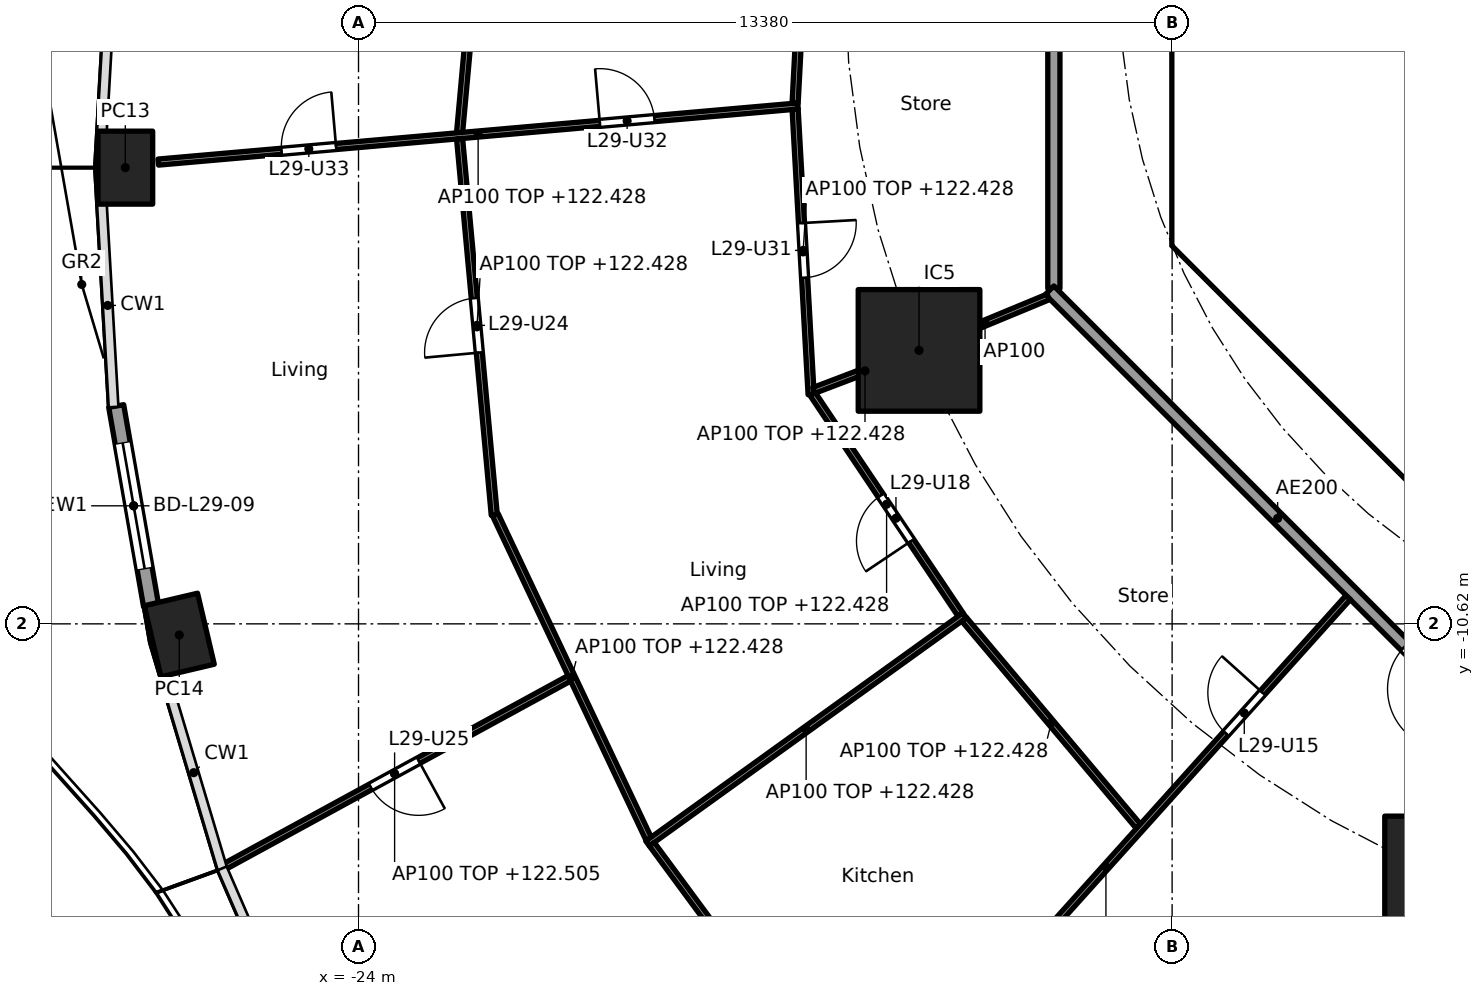
"""IFC4 building model, lengths in metres.
Left out: names, types, materials, properties, quantities, classifications, styles, units other than length and angle.
Written with IfcOpenShell. Run it as: python <this file> out.ifc"""

import sys

from ifc_helpers import new_model, si_unit, direction, frame, frame_2d, origin, origin_2d, place, context, subcontext, project, spatial, polyline, rectangle, hollow_rectangle, outline, extrude, element, fill, save


model = new_model("IFC4")
c1 = context("Model", 3, precision=1e-05, world=origin(), true_north=direction((0.0, 1.0)))
c2 = subcontext(c1, "Body", "Model", "MODEL_VIEW")
j1 = project(units=[si_unit("LENGTHUNIT", "METRE"), si_unit("PLANEANGLEUNIT", "RADIAN")], contexts=[c1])
p1 = place(None, origin())
s1 = spatial("IfcSite", under=j1, at=p1, CompositionType="ELEMENT")
p2 = place(p1, origin())
s2 = spatial("IfcBuilding", under=s1, at=p2, CompositionType="ELEMENT")
p3 = place(p2, frame((0.0, 0.0, 119.6)))
s3 = spatial("IfcBuildingStorey", under=s2, at=p3, CompositionType="ELEMENT", Elevation=119.6)
for number, where, z_axis, x_axis in (
    (1, (-27.835, -3.118, -0.26), (0.0, 0.0, 1.0), (0.0, -1.0, 0.0)),
    (2, (-26.948, -10.803, -0.26), (0.0, 0.0, 1.0), (0.229, -0.973, 0.0)),
):
    element("IfcColumn", number, at=place(p3, frame(where, z_axis=z_axis, x_axis=x_axis)), inside=s3, PredefinedType="COLUMN", context=c2, shape_type="SweptSolid", body=[
        extrude(hollow_rectangle(XDim=1.2, YDim=0.9, WallThickness=0.04, at=origin_2d()), origin(), (0.0, 0.0, 1.0), 3.96),
    ])
for number, where, z_axis, x_axis in (
    (3, (-14.782, -6.123, 0.0), (0.0, 0.0, 1.0), (1.0, 0.0, 0.0)),
    (4, (-6.123, -14.782, 0.0), (0.0, 0.0, 1.0), (1.0, 0.0, 0.0)),
):
    element("IfcColumn", number, at=place(p3, frame(where, z_axis=z_axis, x_axis=x_axis)), inside=s3, PredefinedType="COLUMN", context=c2, shape_type="SweptSolid", body=[
        extrude(rectangle(XDim=2.0, YDim=2.0, at=origin_2d()), origin(), (0.0, 0.0, 1.0), 3.7),
    ])
p4 = place(p3, frame((-27.411, -10.32, 0.0), z_axis=(0.0, 0.0, 1.0), x_axis=(-0.172163521006, 0.985068384446, 0.0)))
e5 = element("IfcWall", 5, at=p4, inside=s3, PredefinedType="SOLIDWALL", context=c2, shape_type="SweptSolid", body=[
    extrude(rectangle(XDim=3.333, YDim=0.25, at=frame_2d((1.666, 0.0))), origin(), (0.0, 0.0, 1.0), 3.44),
])
p5 = place(p4, frame((0.616, 0.0, 0.0)))
e6 = element("IfcOpeningElement", 6, at=p5, cuts=e5, PredefinedType="OPENING", context=c2, shape_type="SweptSolid", body=[
    extrude(rectangle(XDim=2.1, YDim=2.4, at=frame_2d((1.05, 1.2))), frame((0.0, 0.135, 0.0), z_axis=(0.0, -1.0, 0.0), x_axis=(1.0, 0.0, 0.0)), (0.0, 0.0, 1.0), 0.27),
])
p6 = place(p3, frame((-10.325, 3.801, 0.0), z_axis=(0.0, 0.0, 1.0), x_axis=(0.0, -1.0, 0.0)))
e7 = element("IfcWall", 7, at=p6, inside=s3, PredefinedType="SHEAR", context=c2, shape_type="SweptSolid", body=[
    extrude(rectangle(XDim=7.602, YDim=0.6, at=frame_2d((3.801, 0.0))), origin(), (0.0, 0.0, 1.0), 3.44),
])
p7 = place(p6, frame((0.651, 0.0, 0.0)))
e8 = element("IfcOpeningElement", 8, at=p7, cuts=e7, PredefinedType="OPENING", context=c2, shape_type="SweptSolid", body=[
    extrude(rectangle(XDim=1.5, YDim=2.1, at=frame_2d((0.75, 1.05))), frame((0.0, 0.31, 0.0), z_axis=(0.0, -1.0, 0.0), x_axis=(1.0, 0.0, 0.0)), (0.0, 0.0, 1.0), 0.62),
])
p8 = place(p6, frame((5.451, 0.0, 0.0)))
e9 = element("IfcOpeningElement", 9, at=p8, cuts=e7, PredefinedType="OPENING", context=c2, shape_type="SweptSolid", body=[
    extrude(rectangle(XDim=1.5, YDim=2.1, at=frame_2d((0.75, 1.05))), frame((0.0, 0.31, 0.0), z_axis=(0.0, -1.0, 0.0), x_axis=(1.0, 0.0, 0.0)), (0.0, 0.0, 1.0), 0.62),
])
p9 = place(p3, frame((-9.988, -4.613, 0.0), z_axis=(0.0, 0.0, 1.0), x_axis=(0.707106781187, -0.707106781187, 0.0)))
e10 = element("IfcWall", 10, at=p9, inside=s3, PredefinedType="SHEAR", context=c2, shape_type="SweptSolid", body=[
    extrude(rectangle(XDim=7.602, YDim=0.6, at=frame_2d((3.801, 0.0))), origin(), (0.0, 0.0, 1.0), 3.44),
])
p10 = place(p9, frame((6.151, 0.0, 0.0)))
e11 = element("IfcOpeningElement", 11, at=p10, cuts=e10, PredefinedType="OPENING", context=c2, shape_type="SweptSolid", body=[
    extrude(rectangle(XDim=1.1, YDim=2.1, at=frame_2d((0.55, 1.05))), frame((0.0, 0.31, 0.0), z_axis=(0.0, -1.0, 0.0), x_axis=(1.0, 0.0, 0.0)), (0.0, 0.0, 1.0), 0.62),
])
p11 = place(p3, origin())
e12 = element("IfcWall", 12, at=p11, inside=s3, PredefinedType="SHEAR", context=c2, shape_type="SweptSolid", body=[
    extrude(outline(polyline([(-10.625, -3.801), (-10.025, -3.801), (-10.025, -4.152), (-9.776, -4.401), (-10.2, -4.825), (-10.625, -4.401), (-10.625, -3.801)])), origin(), (0.0, 0.0, 1.0), 3.44),
])
p12 = place(p3, frame((-10.025, -4.0, 0.0), z_axis=(0.0, 0.0, 1.0), x_axis=(1.0, 0.0, 0.0)))
e13 = element("IfcWall", 13, at=p12, inside=s3, PredefinedType="PARTITIONING", context=c2, shape_type="SweptSolid", body=[
    extrude(rectangle(XDim=3.325, YDim=0.2, at=frame_2d((1.662, 0.0))), origin(), (0.0, 0.0, 1.0), 3.44),
])
p13 = place(p3, frame((-12.565, 5.304, 0.0), z_axis=(0.0, 0.0, 1.0), x_axis=(0.0, -1.0, 0.0)))
e14 = element("IfcWall", 14, at=p13, inside=s3, PredefinedType="PARTITIONING", context=c2, shape_type="SweptSolid", body=[
    extrude(rectangle(XDim=10.409, YDim=0.2, at=frame_2d((5.205, 0.0))), origin(), (0.0, 0.0, 1.0), 3.44),
])
p14 = place(p3, frame((-12.635, -5.134, 0.0), z_axis=(0.0, 0.0, 1.0), x_axis=(0.707106781187, -0.707106781187, 0.0)))
e15 = element("IfcWall", 15, at=p14, inside=s3, PredefinedType="PARTITIONING", context=c2, shape_type="SweptSolid", body=[
    extrude(rectangle(XDim=10.609, YDim=0.2, at=frame_2d((5.305, 0.0))), origin(), (0.0, 0.0, 1.0), 3.44),
])
p15 = place(p14, frame((8.274, 0.0, 0.0)))
e16 = element("IfcOpeningElement", 16, at=p15, cuts=e15, PredefinedType="OPENING", context=c2, shape_type="SweptSolid", body=[
    extrude(rectangle(XDim=1.0, YDim=2.1, at=frame_2d((0.5, 1.05))), frame((0.0, 0.11, 0.0), z_axis=(0.0, -1.0, 0.0), x_axis=(1.0, 0.0, 0.0)), (0.0, 0.0, 1.0), 0.22),
])
p16 = place(p3, frame((-16.576, 2.585, 0.0), z_axis=(0.0, 0.0, 1.0), x_axis=(-0.052509224895, -0.998620439056, 0.0)))
e17 = element("IfcWall", 17, at=p16, inside=s3, PredefinedType="PARTITIONING", context=c2, shape_type="SweptSolid", body=[
    extrude(rectangle(XDim=4.649, YDim=0.1, at=frame_2d((2.325, 0.0))), origin(), (0.0, 0.0, 1.0), 2.828),
])
p17 = place(p3, frame((-21.777, 3.621, 0.0), z_axis=(0.0, 0.0, 1.0), x_axis=(-0.090606877484, -0.995886737412, 0.0)))
e18 = element("IfcWall", 18, at=p17, inside=s3, PredefinedType="PARTITIONING", context=c2, shape_type="SweptSolid", body=[
    extrude(rectangle(XDim=6.189, YDim=0.1, at=frame_2d((3.095, 0.0))), origin(), (0.0, 0.0, 1.0), 2.828),
])
p18 = place(p3, frame((-16.773, -2.104, 0.0), z_axis=(0.0, 0.0, 1.0), x_axis=(-0.996176206701, -0.087366842701, 0.0)))
e19 = element("IfcWall", 19, at=p18, inside=s3, PredefinedType="PARTITIONING", context=c2, shape_type="SweptSolid", body=[
    extrude(rectangle(XDim=10.56, YDim=0.1, at=frame_2d((5.28, 0.0))), origin(), (0.0, 0.0, 1.0), 2.828),
])
p19 = place(p18, frame((2.37, 0.0, 0.0)))
e20 = element("IfcOpeningElement", 20, at=p19, cuts=e19, PredefinedType="OPENING", context=c2, shape_type="SweptSolid", body=[
    extrude(rectangle(XDim=0.9, YDim=2.1, at=frame_2d((0.45, 1.05))), frame((0.0, 0.06, 0.0), z_axis=(0.0, -1.0, 0.0), x_axis=(1.0, 0.0, 0.0)), (0.0, 0.0, 1.0), 0.12),
])
p20 = place(p18, frame((7.625, 0.0, 0.0)))
e21 = element("IfcOpeningElement", 21, at=p20, cuts=e19, PredefinedType="OPENING", context=c2, shape_type="SweptSolid", body=[
    extrude(rectangle(XDim=0.9, YDim=2.1, at=frame_2d((0.45, 1.05))), frame((0.0, 0.06, 0.0), z_axis=(0.0, -1.0, 0.0), x_axis=(1.0, 0.0, 0.0)), (0.0, 0.0, 1.0), 0.12),
])
p21 = place(p3, frame((-16.82, -2.158, 0.0), z_axis=(0.0, 0.0, 1.0), x_axis=(0.055967931845, -0.998432566879, 0.0)))
e22 = element("IfcWall", 22, at=p21, inside=s3, PredefinedType="PARTITIONING", context=c2, shape_type="SweptSolid", body=[
    extrude(rectangle(XDim=4.698, YDim=0.1, at=frame_2d((2.349, 0.0))), origin(), (0.0, 0.0, 1.0), 2.828),
])
p22 = place(p21, frame((1.874, 0.0, 0.0)))
e23 = element("IfcOpeningElement", 23, at=p22, cuts=e22, PredefinedType="OPENING", context=c2, shape_type="SweptSolid", body=[
    extrude(rectangle(XDim=0.9, YDim=2.1, at=frame_2d((0.45, 1.05))), frame((0.0, 0.06, 0.0), z_axis=(0.0, -1.0, 0.0), x_axis=(1.0, 0.0, 0.0)), (0.0, 0.0, 1.0), 0.12),
])
p23 = place(p3, frame((-22.338, -2.642, 0.0), z_axis=(0.0, 0.0, 1.0), x_axis=(0.091768304523, -0.995780386574, 0.0)))
e24 = element("IfcWall", 24, at=p23, inside=s3, PredefinedType="PARTITIONING", context=c2, shape_type="SweptSolid", body=[
    extrude(rectangle(XDim=6.215, YDim=0.1, at=frame_2d((3.107, 0.0))), origin(), (0.0, 0.0, 1.0), 2.828),
])
p24 = place(p23, frame((2.632, 0.0, 0.0)))
e25 = element("IfcOpeningElement", 25, at=p24, cuts=e24, PredefinedType="OPENING", context=c2, shape_type="SweptSolid", body=[
    extrude(rectangle(XDim=0.9, YDim=2.1, at=frame_2d((0.45, 1.05))), frame((0.0, 0.06, 0.0), z_axis=(0.0, -1.0, 0.0), x_axis=(1.0, 0.0, 0.0)), (0.0, 0.0, 1.0), 0.12),
])
p25 = place(p3, frame((-12.657, -5.243, 0.0), z_axis=(0.0, 0.0, 1.0), x_axis=(-0.923864733477, -0.382719158442, 0.0)))
e26 = element("IfcWall", 26, at=p25, inside=s3, PredefinedType="PARTITIONING", context=c2, shape_type="SweptSolid", body=[
    extrude(rectangle(XDim=2.25, YDim=0.1, at=frame_2d((1.125, 0.0))), origin(), (0.0, 0.0, 1.0), 3.44),
])
p26 = place(p3, frame((-14.829, -6.141, 0.0), z_axis=(0.0, 0.0, 1.0), x_axis=(-0.934704367514, -0.355426146128, 0.0)))
e27 = element("IfcWall", 27, at=p26, inside=s3, PredefinedType="PARTITIONING", context=c2, shape_type="SweptSolid", body=[
    extrude(rectangle(XDim=1.802, YDim=0.1, at=frame_2d((0.901, 0.0))), origin(), (0.0, 0.0, 1.0), 2.828),
])
p27 = place(p3, frame((-16.532, -6.84, 0.0), z_axis=(0.0, 0.0, 1.0), x_axis=(0.556994773624, -0.830515997531, 0.0)))
e28 = element("IfcWall", 28, at=p27, inside=s3, PredefinedType="PARTITIONING", context=c2, shape_type="SweptSolid", body=[
    extrude(rectangle(XDim=4.366, YDim=0.1, at=frame_2d((2.183, 0.0))), origin(), (0.0, 0.0, 1.0), 2.828),
])
p28 = place(p27, frame((2.01, 0.0, 0.0)))
e29 = element("IfcOpeningElement", 29, at=p28, cuts=e28, PredefinedType="OPENING", context=c2, shape_type="SweptSolid", body=[
    extrude(rectangle(XDim=0.9, YDim=2.1, at=frame_2d((0.45, 1.05))), frame((0.0, 0.06, 0.0), z_axis=(0.0, -1.0, 0.0), x_axis=(1.0, 0.0, 0.0)), (0.0, 0.0, 1.0), 0.12),
])
p29 = place(p3, frame((-21.75, -8.826, 0.0), z_axis=(0.0, 0.0, 1.0), x_axis=(0.427739388908, -0.903902104863, 0.0)))
e30 = element("IfcWall", 30, at=p29, inside=s3, PredefinedType="PARTITIONING", context=c2, shape_type="SweptSolid", body=[
    extrude(rectangle(XDim=5.899, YDim=0.1, at=frame_2d((2.949, 0.0))), origin(), (0.0, 0.0, 1.0), 2.828),
])
p30 = place(p3, frame((-20.533, -11.516, 0.0), z_axis=(0.0, 0.0, 1.0), x_axis=(-0.877731656478, -0.479152521872, 0.0)))
e31 = element("IfcWall", 31, at=p30, inside=s3, PredefinedType="PARTITIONING", context=c2, shape_type="SweptSolid", body=[
    extrude(rectangle(XDim=6.548, YDim=0.1, at=frame_2d((3.274, 0.0))), origin(), (0.0, 0.0, 1.0), 2.905),
])
p31 = place(p30, frame((2.824, 0.0, 0.0)))
e32 = element("IfcOpeningElement", 32, at=p31, cuts=e31, PredefinedType="OPENING", context=c2, shape_type="SweptSolid", body=[
    extrude(rectangle(XDim=0.9, YDim=2.1, at=frame_2d((0.45, 1.05))), frame((0.0, 0.06, 0.0), z_axis=(0.0, -1.0, 0.0), x_axis=(1.0, 0.0, 0.0)), (0.0, 0.0, 1.0), 0.12),
])
p32 = place(p3, frame((-14.031, -10.479, 0.0), z_axis=(0.0, 0.0, 1.0), x_axis=(-0.811653955345, -0.584138559567, 0.0)))
e33 = element("IfcWall", 33, at=p32, inside=s3, PredefinedType="PARTITIONING", context=c2, shape_type="SweptSolid", body=[
    extrude(rectangle(XDim=6.426, YDim=0.1, at=frame_2d((3.213, 0.0))), origin(), (0.0, 0.0, 1.0), 2.828),
])
p33 = place(p3, frame((-14.04, -10.547, 0.0), z_axis=(0.0, 0.0, 1.0), x_axis=(0.644036028289, -0.764995159635, 0.0)))
e34 = element("IfcWall", 34, at=p33, inside=s3, PredefinedType="PARTITIONING", context=c2, shape_type="SweptSolid", body=[
    extrude(rectangle(XDim=4.448, YDim=0.1, at=frame_2d((2.224, 0.0))), origin(), (0.0, 0.0, 1.0), 2.828),
])
p34 = place(p3, frame((-19.176, -14.244, 0.0), z_axis=(0.0, 0.0, 1.0), x_axis=(0.593532053206, -0.80481035146, 0.0)))
e35 = element("IfcWall", 35, at=p34, inside=s3, PredefinedType="PARTITIONING", context=c2, shape_type="SweptSolid", body=[
    extrude(rectangle(XDim=5.876, YDim=0.1, at=frame_2d((2.938, 0.0))), origin(), (0.0, 0.0, 1.0), 2.828),
])
p35 = place(p34, frame((3.957, 0.0, 0.0)))
e36 = element("IfcOpeningElement", 36, at=p35, cuts=e35, PredefinedType="OPENING", context=c2, shape_type="SweptSolid", body=[
    extrude(rectangle(XDim=0.9, YDim=2.1, at=frame_2d((0.45, 1.05))), frame((0.0, 0.06, 0.0), z_axis=(0.0, -1.0, 0.0), x_axis=(1.0, 0.0, 0.0)), (0.0, 0.0, 1.0), 0.12),
])
p36 = place(p3, frame((-7.725, -10.186, 0.0), z_axis=(0.0, 0.0, 1.0), x_axis=(-0.668498346565, -0.743713628112, 0.0)))
e37 = element("IfcWall", 37, at=p36, inside=s3, PredefinedType="PARTITIONING", context=c2, shape_type="SweptSolid", body=[
    extrude(rectangle(XDim=11.919, YDim=0.1, at=frame_2d((5.959, 0.0))), origin(), (0.0, 0.0, 1.0), 2.756),
])
p37 = place(p36, frame((2.106, 0.0, 0.0)))
e38 = element("IfcOpeningElement", 38, at=p37, cuts=e37, PredefinedType="OPENING", context=c2, shape_type="SweptSolid", body=[
    extrude(rectangle(XDim=0.9, YDim=2.1, at=frame_2d((0.45, 1.05))), frame((0.0, 0.06, 0.0), z_axis=(0.0, -1.0, 0.0), x_axis=(1.0, 0.0, 0.0)), (0.0, 0.0, 1.0), 0.12),
])
p38 = place(p36, frame((8.041, 0.0, 0.0)))
e39 = element("IfcOpeningElement", 39, at=p38, cuts=e37, PredefinedType="OPENING", context=c2, shape_type="SweptSolid", body=[
    extrude(rectangle(XDim=0.9, YDim=2.1, at=frame_2d((0.45, 1.05))), frame((0.0, 0.06, 0.0), z_axis=(0.0, -1.0, 0.0), x_axis=(1.0, 0.0, 0.0)), (0.0, 0.0, 1.0), 0.12),
])
p39 = place(p3, frame((-6.149, -14.825, 0.0), z_axis=(0.0, 0.0, 1.0), x_axis=(-0.525396393596, -0.850857584791, 0.0)))
e40 = element("IfcWall", 40, at=p39, inside=s3, PredefinedType="PARTITIONING", context=c2, shape_type="SweptSolid", body=[
    extrude(rectangle(XDim=9.643, YDim=0.1, at=frame_2d((4.822, 0.0))), origin(), (0.0, 0.0, 1.0), 3.44),
])
p40 = place(p39, frame((1.485, 0.0, 0.0)))
e41 = element("IfcOpeningElement", 41, at=p40, cuts=e40, PredefinedType="OPENING", context=c2, shape_type="SweptSolid", body=[
    extrude(rectangle(XDim=0.9, YDim=2.1, at=frame_2d((0.45, 1.05))), frame((0.0, 0.06, 0.0), z_axis=(0.0, -1.0, 0.0), x_axis=(1.0, 0.0, 0.0)), (0.0, 0.0, 1.0), 0.12),
])
p41 = place(p39, frame((5.744, 0.0, 0.0)))
e42 = element("IfcOpeningElement", 42, at=p41, cuts=e40, PredefinedType="OPENING", context=c2, shape_type="SweptSolid", body=[
    extrude(rectangle(XDim=0.9, YDim=2.1, at=frame_2d((0.45, 1.05))), frame((0.0, 0.06, 0.0), z_axis=(0.0, -1.0, 0.0), x_axis=(1.0, 0.0, 0.0)), (0.0, 0.0, 1.0), 0.12),
])
p42 = place(p5, origin())
e43 = element("IfcDoor", 43, at=p42, inside=s3, OperationType="SLIDING_TO_LEFT", PredefinedType="DOOR", context=c2, shape_type="SweptSolid", body=[
    extrude(rectangle(XDim=2.1, YDim=2.4, at=frame_2d((1.05, 1.2))), frame((0.0, 0.025, 0.0), z_axis=(0.0, -1.0, 0.0), x_axis=(1.0, 0.0, 0.0)), (0.0, 0.0, 1.0), 0.05),
])
fill(e6, e43)
p43 = place(p8, origin())
e44 = element("IfcDoor", 44, at=p43, inside=s3, OperationType="DOUBLE_DOOR_SINGLE_SWING", PredefinedType="DOOR", context=c2, shape_type="SweptSolid", body=[
    extrude(rectangle(XDim=1.5, YDim=2.1, at=frame_2d((0.75, 1.05))), frame((0.0, 0.025, 0.0), z_axis=(0.0, -1.0, 0.0), x_axis=(1.0, 0.0, 0.0)), (0.0, 0.0, 1.0), 0.05),
])
fill(e9, e44)
p44 = place(p15, frame((1.0, 0.0, 0.0), x_axis=(-1.0, 0.0, 0.0)))
e45 = element("IfcDoor", 45, at=p44, inside=s3, OperationType="SINGLE_SWING_LEFT", PredefinedType="DOOR", context=c2, shape_type="SweptSolid", body=[
    extrude(rectangle(XDim=1.0, YDim=2.1, at=frame_2d((0.5, 1.05))), frame((0.0, 0.025, 0.0), z_axis=(0.0, -1.0, 0.0), x_axis=(1.0, 0.0, 0.0)), (0.0, 0.0, 1.0), 0.05),
])
fill(e16, e45)
p45 = place(p37, frame((0.9, 0.0, 0.0), x_axis=(-1.0, 0.0, 0.0)))
e46 = element("IfcDoor", 46, at=p45, inside=s3, OperationType="SINGLE_SWING_RIGHT", PredefinedType="DOOR", context=c2, shape_type="SweptSolid", body=[
    extrude(rectangle(XDim=0.9, YDim=2.1, at=frame_2d((0.45, 1.05))), frame((0.0, 0.025, 0.0), z_axis=(0.0, -1.0, 0.0), x_axis=(1.0, 0.0, 0.0)), (0.0, 0.0, 1.0), 0.05),
])
fill(e38, e46)
p46 = place(p28, frame((0.9, 0.0, 0.0), x_axis=(-1.0, 0.0, 0.0)))
e47 = element("IfcDoor", 47, at=p46, inside=s3, OperationType="SINGLE_SWING_LEFT", PredefinedType="DOOR", context=c2, shape_type="SweptSolid", body=[
    extrude(rectangle(XDim=0.9, YDim=2.1, at=frame_2d((0.45, 1.05))), frame((0.0, 0.025, 0.0), z_axis=(0.0, -1.0, 0.0), x_axis=(1.0, 0.0, 0.0)), (0.0, 0.0, 1.0), 0.05),
])
fill(e29, e47)
p47 = place(p24, frame((0.9, 0.0, 0.0), x_axis=(-1.0, 0.0, 0.0)))
e48 = element("IfcDoor", 48, at=p47, inside=s3, OperationType="SINGLE_SWING_LEFT", PredefinedType="DOOR", context=c2, shape_type="SweptSolid", body=[
    extrude(rectangle(XDim=0.9, YDim=2.1, at=frame_2d((0.45, 1.05))), frame((0.0, 0.025, 0.0), z_axis=(0.0, -1.0, 0.0), x_axis=(1.0, 0.0, 0.0)), (0.0, 0.0, 1.0), 0.05),
])
fill(e25, e48)
p48 = place(p31, origin())
e49 = element("IfcDoor", 49, at=p48, inside=s3, OperationType="SINGLE_SWING_LEFT", PredefinedType="DOOR", context=c2, shape_type="SweptSolid", body=[
    extrude(rectangle(XDim=0.9, YDim=2.1, at=frame_2d((0.45, 1.05))), frame((0.0, 0.025, 0.0), z_axis=(0.0, -1.0, 0.0), x_axis=(1.0, 0.0, 0.0)), (0.0, 0.0, 1.0), 0.05),
])
fill(e32, e49)
p49 = place(p22, origin())
e50 = element("IfcDoor", 50, at=p49, inside=s3, OperationType="SINGLE_SWING_LEFT", PredefinedType="DOOR", context=c2, shape_type="SweptSolid", body=[
    extrude(rectangle(XDim=0.9, YDim=2.1, at=frame_2d((0.45, 1.05))), frame((0.0, 0.025, 0.0), z_axis=(0.0, -1.0, 0.0), x_axis=(1.0, 0.0, 0.0)), (0.0, 0.0, 1.0), 0.05),
])
fill(e23, e50)
p50 = place(p19, frame((0.9, 0.0, 0.0), x_axis=(-1.0, 0.0, 0.0)))
e51 = element("IfcDoor", 51, at=p50, inside=s3, OperationType="SINGLE_SWING_LEFT", PredefinedType="DOOR", context=c2, shape_type="SweptSolid", body=[
    extrude(rectangle(XDim=0.9, YDim=2.1, at=frame_2d((0.45, 1.05))), frame((0.0, 0.025, 0.0), z_axis=(0.0, -1.0, 0.0), x_axis=(1.0, 0.0, 0.0)), (0.0, 0.0, 1.0), 0.05),
])
fill(e20, e51)
p51 = place(p20, frame((0.9, 0.0, 0.0), x_axis=(-1.0, 0.0, 0.0)))
e52 = element("IfcDoor", 52, at=p51, inside=s3, OperationType="SINGLE_SWING_RIGHT", PredefinedType="DOOR", context=c2, shape_type="SweptSolid", body=[
    extrude(rectangle(XDim=0.9, YDim=2.1, at=frame_2d((0.45, 1.05))), frame((0.0, 0.025, 0.0), z_axis=(0.0, -1.0, 0.0), x_axis=(1.0, 0.0, 0.0)), (0.0, 0.0, 1.0), 0.05),
])
fill(e21, e52)
save(model, sys.argv[1])
